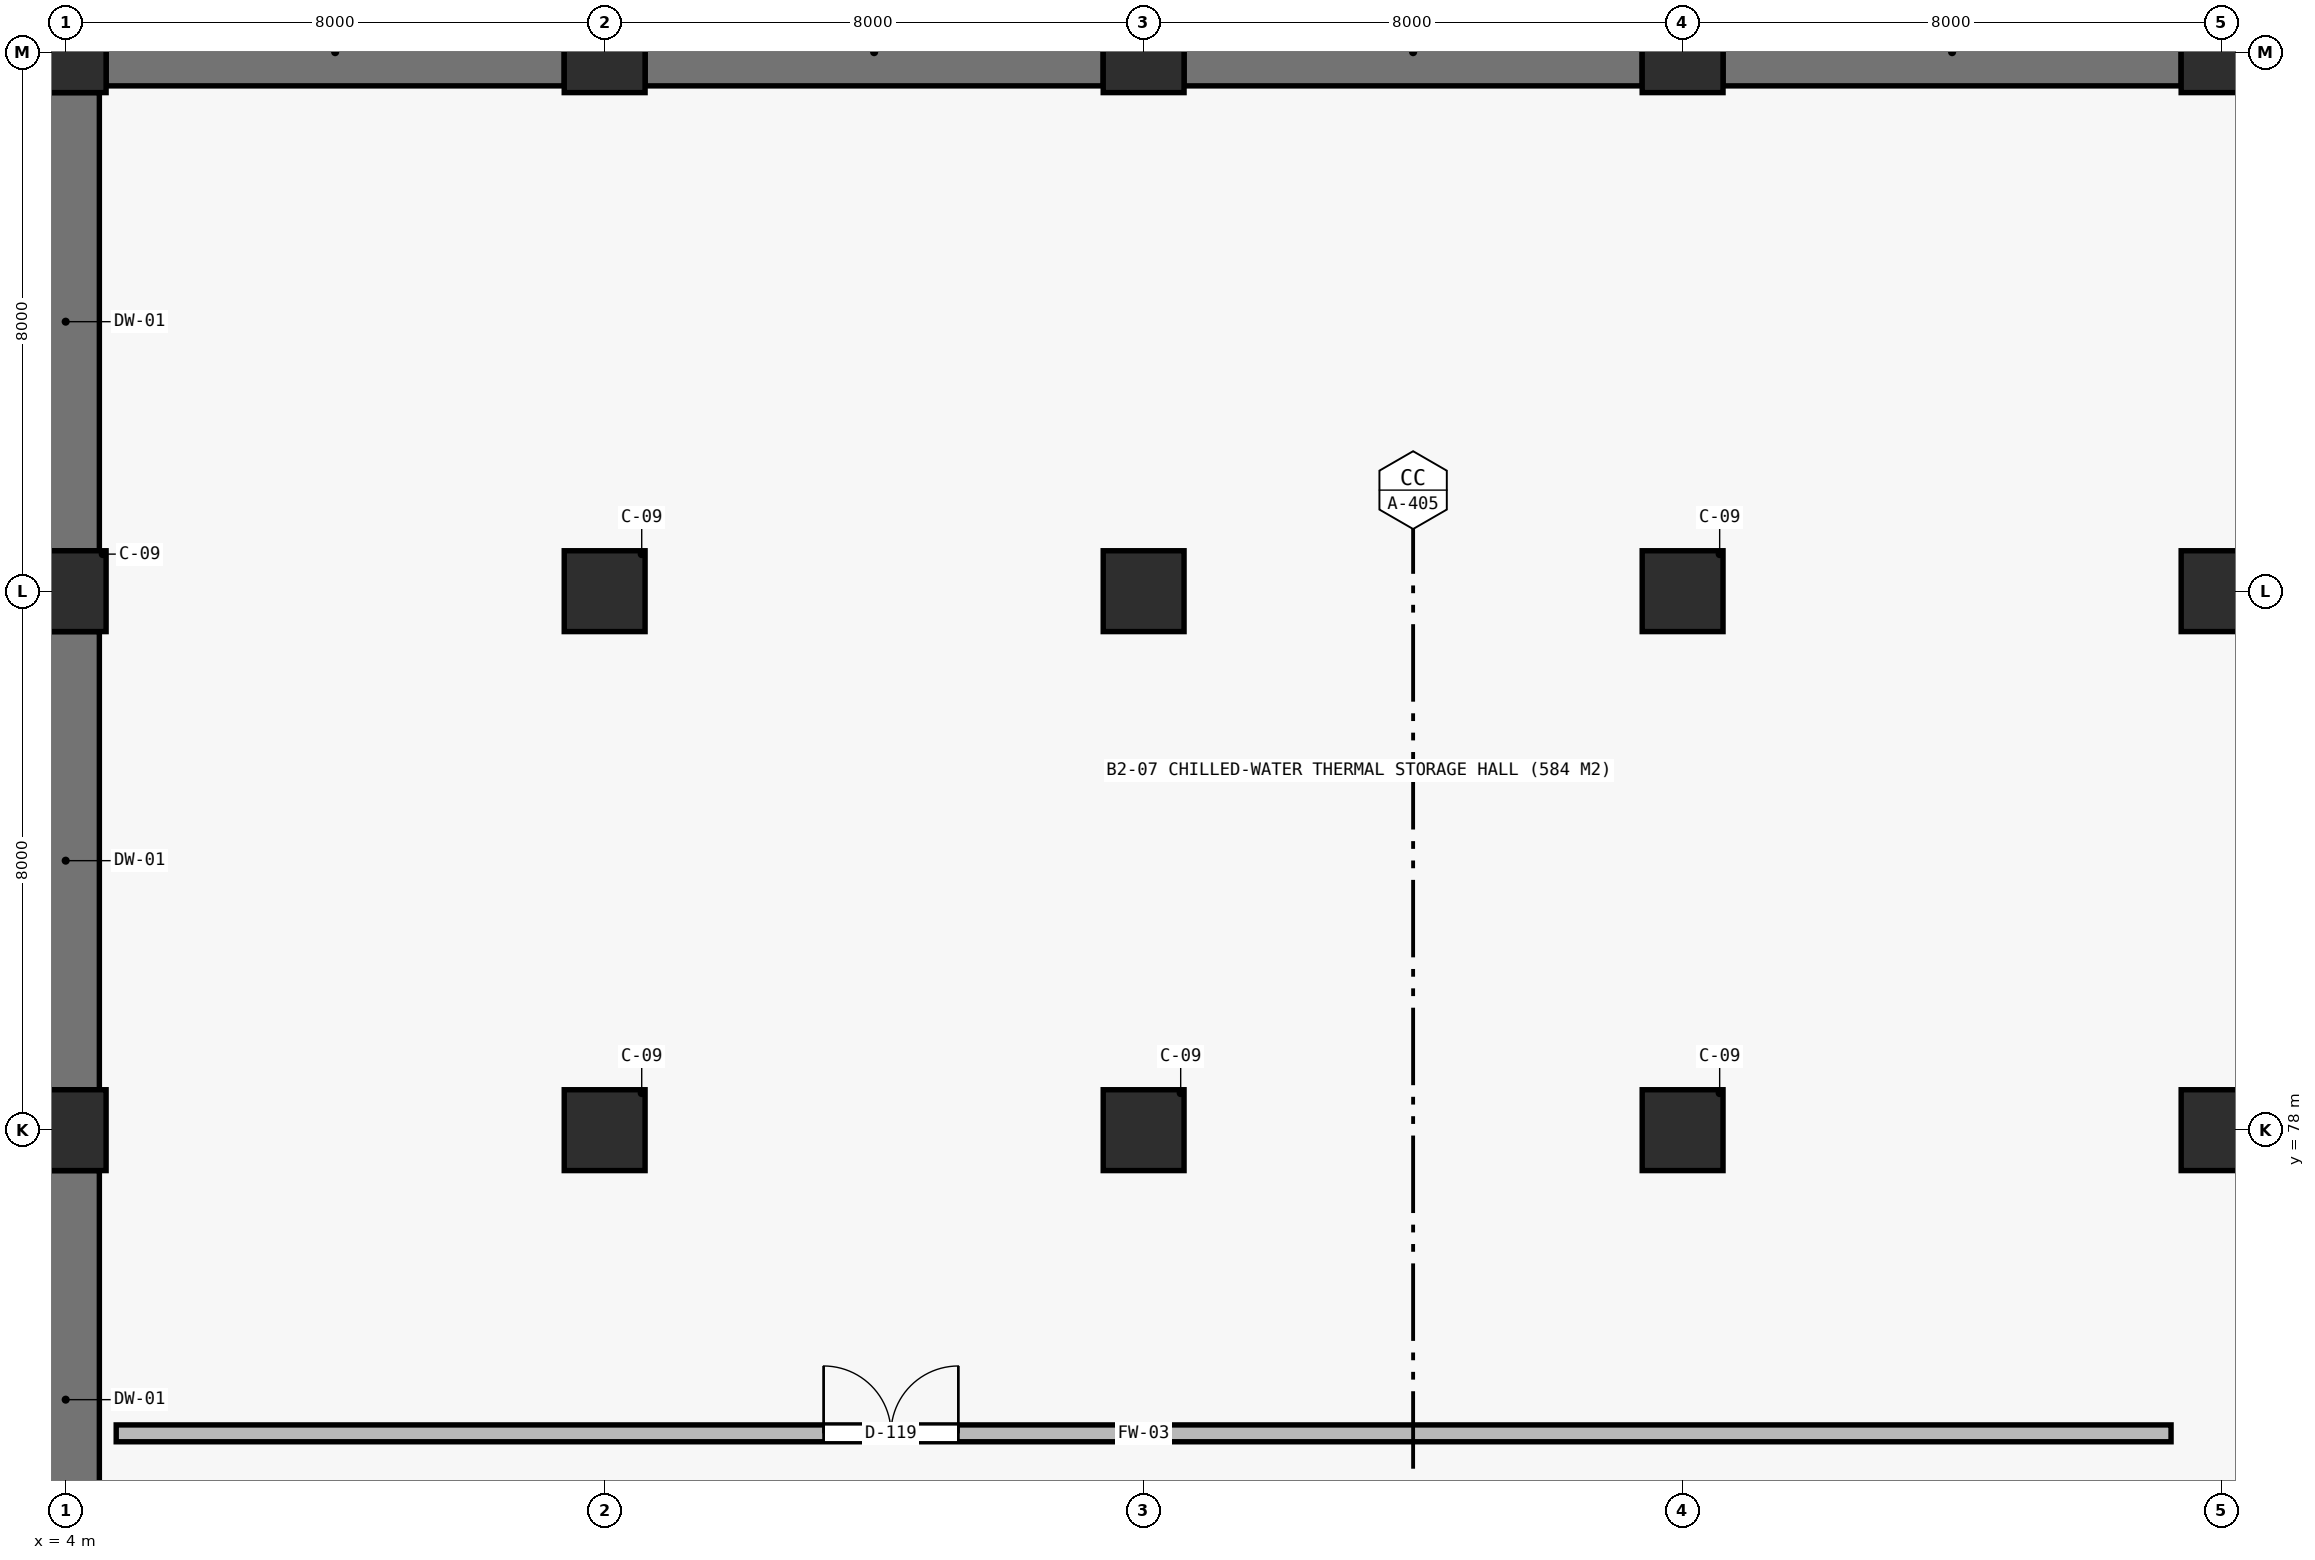
"""IFC4 building model, lengths in metres.
Left out: names, types, materials, properties, quantities, classifications, styles, units other than length and angle.
Written with IfcOpenShell. Run it as: python <this file> out.ifc"""

import sys

from ifc_helpers import new_model, si_unit, direction, frame, frame_2d, origin, origin_2d, place, context, subcontext, project, spatial, rectangle, extrude, element, fill, save


model = new_model("IFC4")
c1 = context("Model", 3, precision=1e-05, world=origin(), true_north=direction((0.0, 1.0)))
c2 = subcontext(c1, "Body", "Model", "MODEL_VIEW")
j1 = project(units=[si_unit("LENGTHUNIT", "METRE"), si_unit("PLANEANGLEUNIT", "RADIAN")], contexts=[c1])
p1 = place(None, origin())
s1 = spatial("IfcSite", under=j1, at=p1, CompositionType="ELEMENT")
p2 = place(p1, origin())
s2 = spatial("IfcBuilding", under=s1, at=p2, CompositionType="ELEMENT")
p3 = place(p2, frame((0.0, 0.0, -12.6)))
s3 = spatial("IfcBuildingStorey", under=s2, at=p3, CompositionType="ELEMENT", Elevation=-12.6)
for number, where, z_axis, x_axis in (
    (1, (4.0, 78.0, 0.0), (0.0, 0.0, 1.0), (1.0, 0.0, 0.0)),
    (2, (4.0, 86.0, 0.0), (0.0, 0.0, 1.0), (1.0, 0.0, 0.0)),
    (3, (4.0, 94.0, 0.0), (0.0, 0.0, 1.0), (1.0, 0.0, 0.0)),
    (4, (12.0, 78.0, 0.0), (0.0, 0.0, 1.0), (1.0, 0.0, 0.0)),
    (5, (12.0, 86.0, 0.0), (0.0, 0.0, 1.0), (1.0, 0.0, 0.0)),
    (6, (12.0, 94.0, 0.0), (0.0, 0.0, 1.0), (1.0, 0.0, 0.0)),
    (7, (20.0, 78.0, 0.0), (0.0, 0.0, 1.0), (1.0, 0.0, 0.0)),
    (8, (20.0, 86.0, 0.0), (0.0, 0.0, 1.0), (1.0, 0.0, 0.0)),
    (9, (20.0, 94.0, 0.0), (0.0, 0.0, 1.0), (1.0, 0.0, 0.0)),
    (10, (28.0, 78.0, 0.0), (0.0, 0.0, 1.0), (1.0, 0.0, 0.0)),
    (11, (28.0, 86.0, 0.0), (0.0, 0.0, 1.0), (1.0, 0.0, 0.0)),
    (12, (28.0, 94.0, 0.0), (0.0, 0.0, 1.0), (1.0, 0.0, 0.0)),
    (13, (36.0, 78.0, 0.0), (0.0, 0.0, 1.0), (1.0, 0.0, 0.0)),
    (14, (36.0, 86.0, 0.0), (0.0, 0.0, 1.0), (1.0, 0.0, 0.0)),
    (15, (36.0, 94.0, 0.0), (0.0, 0.0, 1.0), (1.0, 0.0, 0.0)),
):
    element("IfcColumn", number, at=place(p3, frame(where, z_axis=z_axis, x_axis=x_axis)), inside=s3, PredefinedType="COLUMN", context=c2, shape_type="SweptSolid", body=[
        extrude(rectangle(XDim=1.2, YDim=1.2, at=origin_2d()), origin(), (0.0, 0.0, 1.0), 5.9),
    ])
for number, where, z_axis, x_axis in (
    (16, (35.4, 94.0, 0.0), (0.0, 0.0, 1.0), (-1.0, 0.0, 0.0)),
    (17, (27.4, 94.0, 0.0), (0.0, 0.0, 1.0), (-1.0, 0.0, 0.0)),
    (18, (19.4, 94.0, 0.0), (0.0, 0.0, 1.0), (-1.0, 0.0, 0.0)),
    (19, (11.4, 94.0, 0.0), (0.0, 0.0, 1.0), (-1.0, 0.0, 0.0)),
    (20, (4.0, 93.4, 0.0), (0.0, 0.0, 1.0), (0.0, -1.0, 0.0)),
    (21, (4.0, 85.4, 0.0), (0.0, 0.0, 1.0), (0.0, -1.0, 0.0)),
    (22, (4.0, 77.4, 0.0), (0.0, 0.0, 1.0), (0.0, -1.0, 0.0)),
):
    element("IfcWall", number, at=place(p3, frame(where, z_axis=z_axis, x_axis=x_axis)), inside=s3, PredefinedType="USERDEFINED", context=c2, shape_type="SweptSolid", body=[
        extrude(rectangle(XDim=6.8, YDim=1.0, at=frame_2d((3.4, 0.0))), origin(), (0.0, 0.0, 1.0), 5.9),
    ])
p4 = place(p3, frame((4.75, 73.5, 0.0), z_axis=(0.0, 0.0, 1.0), x_axis=(1.0, 0.0, 0.0)))
e23 = element("IfcWall", 23, at=p4, inside=s3, PredefinedType="SOLIDWALL", context=c2, shape_type="SweptSolid", body=[
    extrude(rectangle(XDim=30.5, YDim=0.25, at=frame_2d((15.25, 0.0))), origin(), (0.0, 0.0, 1.0), 5.9),
])
p5 = place(p4, frame((10.5, 0.0, 0.0)))
e24 = element("IfcOpeningElement", 24, at=p5, cuts=e23, PredefinedType="OPENING", context=c2, shape_type="SweptSolid", body=[
    extrude(rectangle(XDim=2.0, YDim=2.3, at=frame_2d((1.0, 1.15))), frame((0.0, 0.135, 0.0), z_axis=(0.0, -1.0, 0.0), x_axis=(1.0, 0.0, 0.0)), (0.0, 0.0, 1.0), 0.27),
])
p6 = place(p5, origin())
e25 = element("IfcDoor", 25, at=p6, inside=s3, OperationType="DOUBLE_DOOR_SINGLE_SWING", PredefinedType="DOOR", context=c2, shape_type="SweptSolid", body=[
    extrude(rectangle(XDim=2.0, YDim=2.3, at=frame_2d((1.0, 1.15))), frame((0.0, 0.025, 0.0), z_axis=(0.0, -1.0, 0.0), x_axis=(1.0, 0.0, 0.0)), (0.0, 0.0, 1.0), 0.05),
])
fill(e24, e25)
save(model, sys.argv[1])
